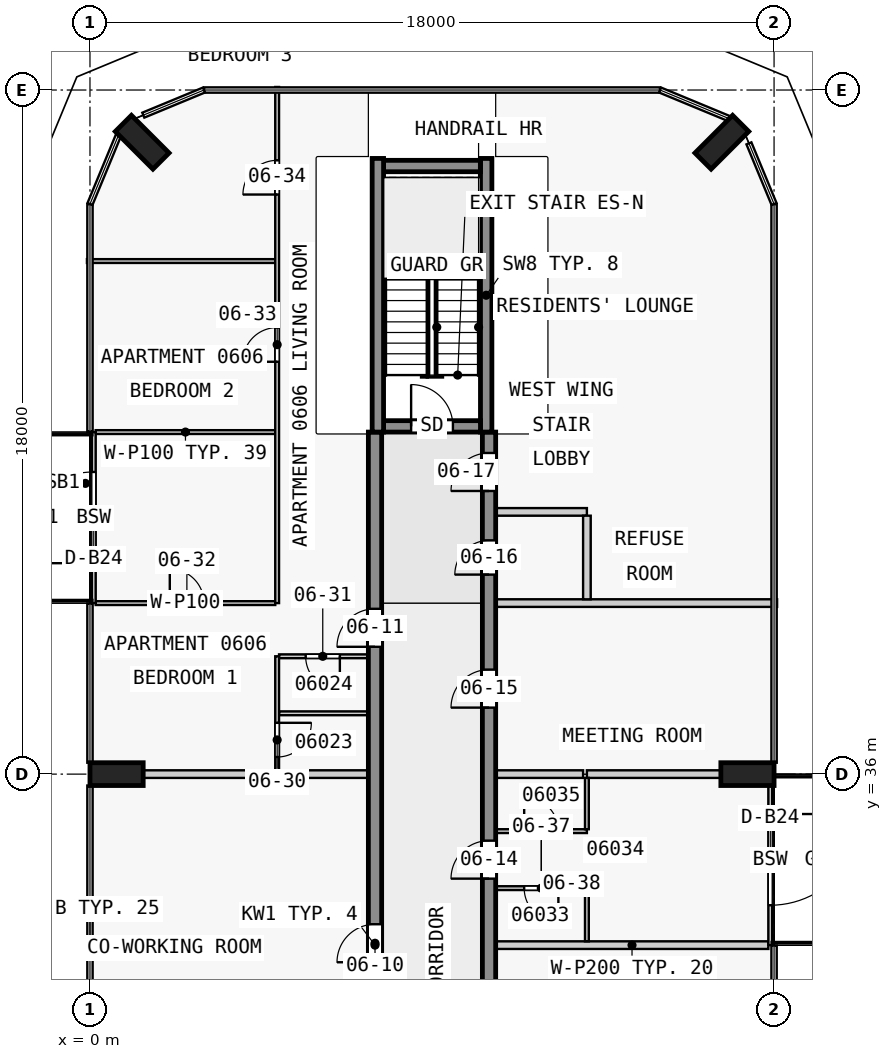
"""IFC4 building model, lengths in metres.
Left out: names, types, materials, properties, quantities, classifications, styles, units other than length and angle.
Written with IfcOpenShell. Run it as: python <this file> out.ifc"""

import sys

from ifc_helpers import new_model, si_unit, direction, frame, frame_2d, origin, origin_2d, place, context, subcontext, project, spatial, rectangle, extrude, element, fill, save


model = new_model("IFC4")
c1 = context("Model", 3, precision=1e-05, world=origin(), true_north=direction((0.0, 1.0)))
c2 = subcontext(c1, "Body", "Model", "MODEL_VIEW")
j1 = project(units=[si_unit("LENGTHUNIT", "METRE"), si_unit("PLANEANGLEUNIT", "RADIAN")], contexts=[c1])
p1 = place(None, origin())
s1 = spatial("IfcSite", under=j1, at=p1, CompositionType="ELEMENT")
p2 = place(p1, origin())
s2 = spatial("IfcBuilding", under=s1, at=p2, CompositionType="ELEMENT")
p3 = place(p2, frame((0.0, 0.0, 30.3)))
s3 = spatial("IfcBuildingStorey", under=s2, at=p3, CompositionType="ELEMENT", Elevation=30.3)
for number, where, z_axis, x_axis in (
    (1, (17.3, 36.0, 0.0), (0.0, 0.0, 1.0), (0.0, 1.0, 0.0)),
    (2, (16.626, 52.626, 0.0), (0.0, 0.0, 1.0), (-0.707, 0.707, 0.0)),
    (3, (1.374, 52.626, 0.0), (0.0, 0.0, 1.0), (0.707, 0.707, 0.0)),
    (4, (0.7, 36.0, 0.0), (0.0, 0.0, 1.0), (0.0, 1.0, 0.0)),
):
    element("IfcColumn", number, at=place(p3, frame(where, z_axis=z_axis, x_axis=x_axis)), inside=s3, PredefinedType="COLUMN", context=c2, shape_type="SweptSolid", body=[
        extrude(rectangle(XDim=0.6, YDim=1.4, at=origin_2d()), origin(), (0.0, 0.0, 1.0), 3.5),
    ])
p4 = place(p3, frame((7.725, 45.15, 0.0), z_axis=(0.0, 0.0, 1.0), x_axis=(1.0, 0.0, 0.0)))
e5 = element("IfcWall", 5, at=p4, inside=s3, PredefinedType="SHEAR", context=c2, shape_type="SweptSolid", body=[
    extrude(rectangle(XDim=2.55, YDim=0.3, at=frame_2d((1.275, 0.0))), origin(), (0.0, 0.0, 1.0), 3.5),
])
p5 = place(p4, frame((0.725, 0.0, 0.0)))
e6 = element("IfcOpeningElement", 6, at=p5, cuts=e5, PredefinedType="OPENING", context=c2, shape_type="SweptSolid", body=[
    extrude(rectangle(XDim=1.1, YDim=2.1, at=frame_2d((0.55, 1.05))), frame((0.0, 0.16, 0.0), z_axis=(0.0, -1.0, 0.0), x_axis=(1.0, 0.0, 0.0)), (0.0, 0.0, 1.0), 0.32),
])
p6 = place(p3, frame((7.725, 52.0, 0.0), z_axis=(0.0, 0.0, 1.0), x_axis=(1.0, 0.0, 0.0)))
e7 = element("IfcWall", 7, at=p6, inside=s3, PredefinedType="SHEAR", context=c2, shape_type="SweptSolid", body=[
    extrude(rectangle(XDim=2.55, YDim=0.3, at=frame_2d((1.275, 0.0))), origin(), (0.0, 0.0, 1.0), 3.5),
])
for number, where, z_axis, x_axis in (
    (8, (7.575, 45.0, 0.0), (0.0, 0.0, 1.0), (0.0, 1.0, 0.0)),
    (9, (10.425, 45.0, 0.0), (0.0, 0.0, 1.0), (0.0, 1.0, 0.0)),
):
    element("IfcWall", number, at=place(p3, frame(where, z_axis=z_axis, x_axis=x_axis)), inside=s3, PredefinedType="SHEAR", context=c2, shape_type="SweptSolid", body=[
        extrude(rectangle(XDim=7.2, YDim=0.3, at=frame_2d((3.6, 0.0))), origin(), (0.0, 0.0, 1.0), 3.5),
    ])
p7 = place(p3, frame((7.5, 18.0, 0.0), z_axis=(0.0, 0.0, 1.0), x_axis=(0.0, 1.0, 0.0)))
e10 = element("IfcWall", 10, at=p7, inside=s3, PredefinedType="SHEAR", context=c2, shape_type="SweptSolid", body=[
    extrude(rectangle(XDim=27.0, YDim=0.35, at=frame_2d((13.5, 0.0))), origin(), (0.0, 0.0, 1.0), 3.25),
])
p8 = place(p7, frame((4.05, 0.0, 0.0)))
e11 = element("IfcOpeningElement", 11, at=p8, cuts=e10, PredefinedType="OPENING", context=c2, shape_type="SweptSolid", body=[
    extrude(rectangle(XDim=1.0, YDim=2.1, at=frame_2d((0.5, 1.05))), frame((0.0, 0.185, 0.0), z_axis=(0.0, -1.0, 0.0), x_axis=(1.0, 0.0, 0.0)), (0.0, 0.0, 1.0), 0.37),
])
p9 = place(p7, frame((13.05, 0.0, 0.0)))
e12 = element("IfcOpeningElement", 12, at=p9, cuts=e10, PredefinedType="OPENING", context=c2, shape_type="SweptSolid", body=[
    extrude(rectangle(XDim=1.0, YDim=2.1, at=frame_2d((0.5, 1.05))), frame((0.0, 0.185, 0.0), z_axis=(0.0, -1.0, 0.0), x_axis=(1.0, 0.0, 0.0)), (0.0, 0.0, 1.0), 0.37),
])
p10 = place(p7, frame((21.35, 0.0, 0.0)))
e13 = element("IfcOpeningElement", 13, at=p10, cuts=e10, PredefinedType="OPENING", context=c2, shape_type="SweptSolid", body=[
    extrude(rectangle(XDim=1.0, YDim=2.1, at=frame_2d((0.5, 1.05))), frame((0.0, 0.185, 0.0), z_axis=(0.0, -1.0, 0.0), x_axis=(1.0, 0.0, 0.0)), (0.0, 0.0, 1.0), 0.37),
])
p11 = place(p3, frame((10.5, 18.0, 0.0), z_axis=(0.0, 0.0, 1.0), x_axis=(0.0, 1.0, 0.0)))
e14 = element("IfcWall", 14, at=p11, inside=s3, PredefinedType="SHEAR", context=c2, shape_type="SweptSolid", body=[
    extrude(rectangle(XDim=27.0, YDim=0.35, at=frame_2d((13.5, 0.0))), origin(), (0.0, 0.0, 1.0), 3.25),
])
p12 = place(p11, frame((1.75, 0.0, 0.0)))
e15 = element("IfcOpeningElement", 15, at=p12, cuts=e14, PredefinedType="OPENING", context=c2, shape_type="SweptSolid", body=[
    extrude(rectangle(XDim=1.0, YDim=2.1, at=frame_2d((0.5, 1.05))), frame((0.0, 0.185, 0.0), z_axis=(0.0, -1.0, 0.0), x_axis=(1.0, 0.0, 0.0)), (0.0, 0.0, 1.0), 0.37),
])
p13 = place(p11, frame((8.55, 0.0, 0.0)))
e16 = element("IfcOpeningElement", 16, at=p13, cuts=e14, PredefinedType="OPENING", context=c2, shape_type="SweptSolid", body=[
    extrude(rectangle(XDim=1.0, YDim=2.1, at=frame_2d((0.5, 1.05))), frame((0.0, 0.185, 0.0), z_axis=(0.0, -1.0, 0.0), x_axis=(1.0, 0.0, 0.0)), (0.0, 0.0, 1.0), 0.37),
])
p14 = place(p11, frame((15.25, 0.0, 0.0)))
e17 = element("IfcOpeningElement", 17, at=p14, cuts=e14, PredefinedType="OPENING", context=c2, shape_type="SweptSolid", body=[
    extrude(rectangle(XDim=1.0, YDim=2.1, at=frame_2d((0.5, 1.05))), frame((0.0, 0.185, 0.0), z_axis=(0.0, -1.0, 0.0), x_axis=(1.0, 0.0, 0.0)), (0.0, 0.0, 1.0), 0.37),
])
p15 = place(p11, frame((19.75, 0.0, 0.0)))
e18 = element("IfcOpeningElement", 18, at=p15, cuts=e14, PredefinedType="OPENING", context=c2, shape_type="SweptSolid", body=[
    extrude(rectangle(XDim=1.0, YDim=2.1, at=frame_2d((0.5, 1.05))), frame((0.0, 0.185, 0.0), z_axis=(0.0, -1.0, 0.0), x_axis=(1.0, 0.0, 0.0)), (0.0, 0.0, 1.0), 0.37),
])
p16 = place(p11, frame((23.25, 0.0, 0.0)))
e19 = element("IfcOpeningElement", 19, at=p16, cuts=e14, PredefinedType="OPENING", context=c2, shape_type="SweptSolid", body=[
    extrude(rectangle(XDim=0.9, YDim=2.1, at=frame_2d((0.45, 1.05))), frame((0.0, 0.185, 0.0), z_axis=(0.0, -1.0, 0.0), x_axis=(1.0, 0.0, 0.0)), (0.0, 0.0, 1.0), 0.37),
])
p17 = place(p11, frame((25.45, 0.0, 0.0)))
e20 = element("IfcOpeningElement", 20, at=p17, cuts=e14, PredefinedType="OPENING", context=c2, shape_type="SweptSolid", body=[
    extrude(rectangle(XDim=1.0, YDim=2.1, at=frame_2d((0.5, 1.05))), frame((0.0, 0.185, 0.0), z_axis=(0.0, -1.0, 0.0), x_axis=(1.0, 0.0, 0.0)), (0.0, 0.0, 1.0), 0.37),
])
p18 = place(p3, frame((0.1, 40.5, 0.0), z_axis=(0.0, 0.0, 1.0), x_axis=(0.0, 1.0, 0.0)))
e21 = element("IfcWall", 21, at=p18, inside=s3, PredefinedType="STANDARD", context=c2, shape_type="SweptSolid", body=[
    extrude(rectangle(XDim=4.5, YDim=0.1, at=frame_2d((2.25, 0.0))), origin(), (0.0, 0.0, 1.0), 3.25),
])
p19 = place(p18, frame((1.05, 0.0, 0.0)))
e22 = element("IfcOpeningElement", 22, at=p19, cuts=e21, PredefinedType="OPENING", context=c2, shape_type="SweptSolid", body=[
    extrude(rectangle(XDim=2.4, YDim=2.4, at=frame_2d((1.2, 1.2))), frame((0.0, 0.06, 0.0), z_axis=(0.0, -1.0, 0.0), x_axis=(1.0, 0.0, 0.0)), (0.0, 0.0, 1.0), 0.12),
])
p20 = place(p3, frame((17.9, 36.0, 0.0), z_axis=(0.0, 0.0, 1.0), x_axis=(0.0, -1.0, 0.0)))
e23 = element("IfcWall", 23, at=p20, inside=s3, PredefinedType="STANDARD", context=c2, shape_type="SweptSolid", body=[
    extrude(rectangle(XDim=4.5, YDim=0.1, at=frame_2d((2.25, 0.0))), origin(), (0.0, 0.0, 1.0), 3.25),
])
p21 = place(p20, frame((1.05, 0.0, 0.0)))
e24 = element("IfcOpeningElement", 24, at=p21, cuts=e23, PredefinedType="OPENING", context=c2, shape_type="SweptSolid", body=[
    extrude(rectangle(XDim=2.4, YDim=2.4, at=frame_2d((1.2, 1.2))), frame((0.0, 0.06, 0.0), z_axis=(0.0, -1.0, 0.0), x_axis=(1.0, 0.0, 0.0)), (0.0, 0.0, 1.0), 0.12),
])
p22 = place(p3, frame((17.85, 31.5, 0.0), z_axis=(0.0, 0.0, 1.0), x_axis=(-1.0, 0.0, 0.0)))
e25 = element("IfcWall", 25, at=p22, inside=s3, PredefinedType="PARTITIONING", context=c2, shape_type="SweptSolid", body=[
    extrude(rectangle(XDim=7.175, YDim=0.2, at=frame_2d((3.587, 0.0))), origin(), (0.0, 0.0, 1.0), 3.25),
])
p23 = place(p3, frame((13.075, 33.0, 0.0), z_axis=(0.0, 0.0, 1.0), x_axis=(-1.0, 0.0, 0.0)))
e26 = element("IfcWall", 26, at=p23, inside=s3, PredefinedType="PARTITIONING", context=c2, shape_type="SweptSolid", body=[
    extrude(rectangle(XDim=2.4, YDim=0.1, at=frame_2d((1.2, 0.0))), origin(), (0.0, 0.0, 1.0), 3.25),
])
p24 = place(p23, frame((0.75, 0.0, 0.0)))
e27 = element("IfcOpeningElement", 27, at=p24, cuts=e26, PredefinedType="OPENING", context=c2, shape_type="SweptSolid", body=[
    extrude(rectangle(XDim=0.9, YDim=2.1, at=frame_2d((0.45, 1.05))), frame((0.0, 0.06, 0.0), z_axis=(0.0, -1.0, 0.0), x_axis=(1.0, 0.0, 0.0)), (0.0, 0.0, 1.0), 0.12),
])
p25 = place(p3, frame((10.675, 34.5, 0.0), z_axis=(0.0, 0.0, 1.0), x_axis=(1.0, 0.0, 0.0)))
e28 = element("IfcWall", 28, at=p25, inside=s3, PredefinedType="PARTITIONING", context=c2, shape_type="SweptSolid", body=[
    extrude(rectangle(XDim=2.4, YDim=0.1, at=frame_2d((1.2, 0.0))), origin(), (0.0, 0.0, 1.0), 3.25),
])
p26 = place(p25, frame((0.75, 0.0, 0.0)))
e29 = element("IfcOpeningElement", 29, at=p26, cuts=e28, PredefinedType="OPENING", context=c2, shape_type="SweptSolid", body=[
    extrude(rectangle(XDim=0.9, YDim=2.1, at=frame_2d((0.45, 1.05))), frame((0.0, 0.06, 0.0), z_axis=(0.0, -1.0, 0.0), x_axis=(1.0, 0.0, 0.0)), (0.0, 0.0, 1.0), 0.12),
])
p27 = place(p3, frame((7.325, 36.0, 0.0), z_axis=(0.0, 0.0, 1.0), x_axis=(-1.0, 0.0, 0.0)))
e30 = element("IfcWall", 30, at=p27, inside=s3, PredefinedType="PARTITIONING", context=c2, shape_type="SweptSolid", body=[
    extrude(rectangle(XDim=5.925, YDim=0.2, at=frame_2d((2.962, 0.0))), origin(), (0.0, 0.0, 1.0), 3.25),
])
p28 = place(p3, frame((12.975, 36.0, 0.0), z_axis=(0.0, 0.0, 1.0), x_axis=(-1.0, 0.0, 0.0)))
e31 = element("IfcWall", 31, at=p28, inside=s3, PredefinedType="PARTITIONING", context=c2, shape_type="SweptSolid", body=[
    extrude(rectangle(XDim=2.3, YDim=0.2, at=frame_2d((1.15, 0.0))), origin(), (0.0, 0.0, 1.0), 3.25),
])
p29 = place(p3, frame((13.075, 36.0, 0.0), z_axis=(0.0, 0.0, 1.0), x_axis=(1.0, 0.0, 0.0)))
e32 = element("IfcWall", 32, at=p29, inside=s3, PredefinedType="PARTITIONING", context=c2, shape_type="SweptSolid", body=[
    extrude(rectangle(XDim=3.525, YDim=0.2, at=frame_2d((1.763, 0.0))), origin(), (0.0, 0.0, 1.0), 3.25),
])
p30 = place(p3, frame((7.325, 37.6, 0.0), z_axis=(0.0, 0.0, 1.0), x_axis=(-1.0, 0.0, 0.0)))
e33 = element("IfcWall", 33, at=p30, inside=s3, PredefinedType="PARTITIONING", context=c2, shape_type="SweptSolid", body=[
    extrude(rectangle(XDim=2.35, YDim=0.1, at=frame_2d((1.175, 0.0))), origin(), (0.0, 0.0, 1.0), 3.25),
])
p31 = place(p3, frame((7.325, 39.1, 0.0), z_axis=(0.0, 0.0, 1.0), x_axis=(-1.0, 0.0, 0.0)))
e34 = element("IfcWall", 34, at=p31, inside=s3, PredefinedType="PARTITIONING", context=c2, shape_type="SweptSolid", body=[
    extrude(rectangle(XDim=2.35, YDim=0.1, at=frame_2d((1.175, 0.0))), origin(), (0.0, 0.0, 1.0), 3.25),
])
p32 = place(p31, frame((0.75, 0.0, 0.0)))
e35 = element("IfcOpeningElement", 35, at=p32, cuts=e34, PredefinedType="OPENING", context=c2, shape_type="SweptSolid", body=[
    extrude(rectangle(XDim=0.9, YDim=2.1, at=frame_2d((0.45, 1.05))), frame((0.0, 0.06, 0.0), z_axis=(0.0, -1.0, 0.0), x_axis=(1.0, 0.0, 0.0)), (0.0, 0.0, 1.0), 0.12),
])
p33 = place(p3, frame((0.15, 40.5, 0.0), z_axis=(0.0, 0.0, 1.0), x_axis=(1.0, 0.0, 0.0)))
e36 = element("IfcWall", 36, at=p33, inside=s3, PredefinedType="PARTITIONING", context=c2, shape_type="SweptSolid", body=[
    extrude(rectangle(XDim=4.725, YDim=0.1, at=frame_2d((2.363, 0.0))), origin(), (0.0, 0.0, 1.0), 3.25),
])
p34 = place(p33, frame((1.95, 0.0, 0.0)))
e37 = element("IfcOpeningElement", 37, at=p34, cuts=e36, PredefinedType="OPENING", context=c2, shape_type="SweptSolid", body=[
    extrude(rectangle(XDim=0.9, YDim=2.1, at=frame_2d((0.45, 1.05))), frame((0.0, 0.06, 0.0), z_axis=(0.0, -1.0, 0.0), x_axis=(1.0, 0.0, 0.0)), (0.0, 0.0, 1.0), 0.12),
])
p35 = place(p3, frame((18.08, 40.5, 0.0), z_axis=(0.0, 0.0, 1.0), x_axis=(-1.0, 0.0, 0.0)))
e38 = element("IfcWall", 38, at=p35, inside=s3, PredefinedType="PARTITIONING", context=c2, shape_type="SweptSolid", body=[
    extrude(rectangle(XDim=7.405, YDim=0.2, at=frame_2d((3.703, 0.0))), origin(), (0.0, 0.0, 1.0), 3.25),
])
p36 = place(p3, frame((13.075, 42.9, 0.0), z_axis=(0.0, 0.0, 1.0), x_axis=(-1.0, 0.0, 0.0)))
e39 = element("IfcWall", 39, at=p36, inside=s3, PredefinedType="PARTITIONING", context=c2, shape_type="SweptSolid", body=[
    extrude(rectangle(XDim=2.4, YDim=0.2, at=frame_2d((1.2, 0.0))), origin(), (0.0, 0.0, 1.0), 3.25),
])
p37 = place(p3, frame((4.875, 45.0, 0.0), z_axis=(0.0, 0.0, 1.0), x_axis=(-1.0, 0.0, 0.0)))
e40 = element("IfcWall", 40, at=p37, inside=s3, PredefinedType="PARTITIONING", context=c2, shape_type="SweptSolid", body=[
    extrude(rectangle(XDim=4.725, YDim=0.1, at=frame_2d((2.363, 0.0))), origin(), (0.0, 0.0, 1.0), 3.25),
])
p38 = place(p3, frame((4.875, 49.5, 0.0), z_axis=(0.0, 0.0, 1.0), x_axis=(-1.0, 0.0, 0.0)))
e41 = element("IfcWall", 41, at=p38, inside=s3, PredefinedType="PARTITIONING", context=c2, shape_type="SweptSolid", body=[
    extrude(rectangle(XDim=4.955, YDim=0.1, at=frame_2d((2.478, 0.0))), origin(), (0.0, 0.0, 1.0), 3.25),
])
p39 = place(p3, frame((4.925, 39.1, 0.0), z_axis=(0.0, 0.0, 1.0), x_axis=(0.0, -1.0, 0.0)))
e42 = element("IfcWall", 42, at=p39, inside=s3, PredefinedType="PARTITIONING", context=c2, shape_type="SweptSolid", body=[
    extrude(rectangle(XDim=3.0, YDim=0.1, at=frame_2d((1.5, 0.0))), origin(), (0.0, 0.0, 1.0), 3.25),
])
p40 = place(p39, frame((1.75, 0.0, 0.0)))
e43 = element("IfcOpeningElement", 43, at=p40, cuts=e42, PredefinedType="OPENING", context=c2, shape_type="SweptSolid", body=[
    extrude(rectangle(XDim=0.9, YDim=2.1, at=frame_2d((0.45, 1.05))), frame((0.0, 0.06, 0.0), z_axis=(0.0, -1.0, 0.0), x_axis=(1.0, 0.0, 0.0)), (0.0, 0.0, 1.0), 0.12),
])
p41 = place(p3, frame((4.925, 40.5, 0.0), z_axis=(0.0, 0.0, 1.0), x_axis=(0.0, 1.0, 0.0)))
e44 = element("IfcWall", 44, at=p41, inside=s3, PredefinedType="PARTITIONING", context=c2, shape_type="SweptSolid", body=[
    extrude(rectangle(XDim=13.58, YDim=0.1, at=frame_2d((6.79, 0.0))), origin(), (0.0, 0.0, 1.0), 3.25),
])
p42 = place(p41, frame((6.35, 0.0, 0.0)))
e45 = element("IfcOpeningElement", 45, at=p42, cuts=e44, PredefinedType="OPENING", context=c2, shape_type="SweptSolid", body=[
    extrude(rectangle(XDim=0.9, YDim=2.1, at=frame_2d((0.45, 1.05))), frame((0.0, 0.06, 0.0), z_axis=(0.0, -1.0, 0.0), x_axis=(1.0, 0.0, 0.0)), (0.0, 0.0, 1.0), 0.12),
])
p43 = place(p41, frame((10.75, 0.0, 0.0)))
e46 = element("IfcOpeningElement", 46, at=p43, cuts=e44, PredefinedType="OPENING", context=c2, shape_type="SweptSolid", body=[
    extrude(rectangle(XDim=0.9, YDim=2.1, at=frame_2d((0.45, 1.05))), frame((0.0, 0.06, 0.0), z_axis=(0.0, -1.0, 0.0), x_axis=(1.0, 0.0, 0.0)), (0.0, 0.0, 1.0), 0.12),
])
for number, where, z_axis, x_axis in (
    (47, (13.075, 31.6, 0.0), (0.0, 0.0, 1.0), (0.0, 1.0, 0.0)),
    (48, (13.075, 34.55, 0.0), (0.0, 0.0, 1.0), (0.0, 1.0, 0.0)),
):
    element("IfcWall", number, at=place(p3, frame(where, z_axis=z_axis, x_axis=x_axis)), inside=s3, PredefinedType="PARTITIONING", context=c2, shape_type="SweptSolid", body=[
        extrude(rectangle(XDim=1.35, YDim=0.1, at=frame_2d((0.675, 0.0))), origin(), (0.0, 0.0, 1.0), 3.25),
    ])
p44 = place(p3, frame((13.075, 40.6, 0.0), z_axis=(0.0, 0.0, 1.0), x_axis=(0.0, 1.0, 0.0)))
e49 = element("IfcWall", 49, at=p44, inside=s3, PredefinedType="PARTITIONING", context=c2, shape_type="SweptSolid", body=[
    extrude(rectangle(XDim=2.2, YDim=0.2, at=frame_2d((1.1, 0.0))), origin(), (0.0, 0.0, 1.0), 3.25),
])
p45 = place(p19, origin())
e50 = element("IfcDoor", 50, at=p45, inside=s3, OperationType="SINGLE_SWING_LEFT", PredefinedType="DOOR", context=c2, shape_type="SweptSolid", body=[
    extrude(rectangle(XDim=2.4, YDim=2.4, at=frame_2d((1.2, 1.2))), frame((0.0, 0.025, 0.0), z_axis=(0.0, -1.0, 0.0), x_axis=(1.0, 0.0, 0.0)), (0.0, 0.0, 1.0), 0.05),
])
fill(e22, e50)
p46 = place(p21, origin())
e51 = element("IfcDoor", 51, at=p46, inside=s3, OperationType="SINGLE_SWING_LEFT", PredefinedType="DOOR", context=c2, shape_type="SweptSolid", body=[
    extrude(rectangle(XDim=2.4, YDim=2.4, at=frame_2d((1.2, 1.2))), frame((0.0, 0.025, 0.0), z_axis=(0.0, -1.0, 0.0), x_axis=(1.0, 0.0, 0.0)), (0.0, 0.0, 1.0), 0.05),
])
fill(e24, e51)
p47 = place(p5, origin())
e52 = element("IfcDoor", 52, at=p47, inside=s3, OperationType="SINGLE_SWING_LEFT", PredefinedType="DOOR", context=c2, shape_type="SweptSolid", body=[
    extrude(rectangle(XDim=1.1, YDim=2.1, at=frame_2d((0.55, 1.05))), frame((0.0, 0.025, 0.0), z_axis=(0.0, -1.0, 0.0), x_axis=(1.0, 0.0, 0.0)), (0.0, 0.0, 1.0), 0.05),
])
fill(e6, e52)
p48 = place(p9, origin())
e53 = element("IfcDoor", 53, at=p48, inside=s3, OperationType="SINGLE_SWING_RIGHT", PredefinedType="DOOR", context=c2, shape_type="SweptSolid", body=[
    extrude(rectangle(XDim=1.0, YDim=2.1, at=frame_2d((0.5, 1.05))), frame((0.0, 0.025, 0.0), z_axis=(0.0, -1.0, 0.0), x_axis=(1.0, 0.0, 0.0)), (0.0, 0.0, 1.0), 0.05),
])
fill(e12, e53)
p49 = place(p10, origin())
e54 = element("IfcDoor", 54, at=p49, inside=s3, OperationType="SINGLE_SWING_RIGHT", PredefinedType="DOOR", context=c2, shape_type="SweptSolid", body=[
    extrude(rectangle(XDim=1.0, YDim=2.1, at=frame_2d((0.5, 1.05))), frame((0.0, 0.025, 0.0), z_axis=(0.0, -1.0, 0.0), x_axis=(1.0, 0.0, 0.0)), (0.0, 0.0, 1.0), 0.05),
])
fill(e13, e54)
p50 = place(p14, origin())
e55 = element("IfcDoor", 55, at=p50, inside=s3, OperationType="SINGLE_SWING_RIGHT", PredefinedType="DOOR", context=c2, shape_type="SweptSolid", body=[
    extrude(rectangle(XDim=1.0, YDim=2.1, at=frame_2d((0.5, 1.05))), frame((0.0, 0.025, 0.0), z_axis=(0.0, -1.0, 0.0), x_axis=(1.0, 0.0, 0.0)), (0.0, 0.0, 1.0), 0.05),
])
fill(e17, e55)
p51 = place(p15, origin())
e56 = element("IfcDoor", 56, at=p51, inside=s3, OperationType="SINGLE_SWING_RIGHT", PredefinedType="DOOR", context=c2, shape_type="SweptSolid", body=[
    extrude(rectangle(XDim=1.0, YDim=2.1, at=frame_2d((0.5, 1.05))), frame((0.0, 0.025, 0.0), z_axis=(0.0, -1.0, 0.0), x_axis=(1.0, 0.0, 0.0)), (0.0, 0.0, 1.0), 0.05),
])
fill(e18, e56)
p52 = place(p16, origin())
e57 = element("IfcDoor", 57, at=p52, inside=s3, OperationType="SINGLE_SWING_RIGHT", PredefinedType="DOOR", context=c2, shape_type="SweptSolid", body=[
    extrude(rectangle(XDim=0.9, YDim=2.1, at=frame_2d((0.45, 1.05))), frame((0.0, 0.025, 0.0), z_axis=(0.0, -1.0, 0.0), x_axis=(1.0, 0.0, 0.0)), (0.0, 0.0, 1.0), 0.05),
])
fill(e19, e57)
p53 = place(p17, origin())
e58 = element("IfcDoor", 58, at=p53, inside=s3, OperationType="SINGLE_SWING_RIGHT", PredefinedType="DOOR", context=c2, shape_type="SweptSolid", body=[
    extrude(rectangle(XDim=1.0, YDim=2.1, at=frame_2d((0.5, 1.05))), frame((0.0, 0.025, 0.0), z_axis=(0.0, -1.0, 0.0), x_axis=(1.0, 0.0, 0.0)), (0.0, 0.0, 1.0), 0.05),
])
fill(e20, e58)
p54 = place(p40, origin())
e59 = element("IfcDoor", 59, at=p54, inside=s3, OperationType="SINGLE_SWING_RIGHT", PredefinedType="DOOR", context=c2, shape_type="SweptSolid", body=[
    extrude(rectangle(XDim=0.9, YDim=2.1, at=frame_2d((0.45, 1.05))), frame((0.0, 0.025, 0.0), z_axis=(0.0, -1.0, 0.0), x_axis=(1.0, 0.0, 0.0)), (0.0, 0.0, 1.0), 0.05),
])
fill(e43, e59)
p55 = place(p32, origin())
e60 = element("IfcDoor", 60, at=p55, inside=s3, OperationType="SINGLE_SWING_RIGHT", PredefinedType="DOOR", context=c2, shape_type="SweptSolid", body=[
    extrude(rectangle(XDim=0.9, YDim=2.1, at=frame_2d((0.45, 1.05))), frame((0.0, 0.025, 0.0), z_axis=(0.0, -1.0, 0.0), x_axis=(1.0, 0.0, 0.0)), (0.0, 0.0, 1.0), 0.05),
])
fill(e35, e60)
p56 = place(p34, origin())
e61 = element("IfcDoor", 61, at=p56, inside=s3, OperationType="SINGLE_SWING_RIGHT", PredefinedType="DOOR", context=c2, shape_type="SweptSolid", body=[
    extrude(rectangle(XDim=0.9, YDim=2.1, at=frame_2d((0.45, 1.05))), frame((0.0, 0.025, 0.0), z_axis=(0.0, -1.0, 0.0), x_axis=(1.0, 0.0, 0.0)), (0.0, 0.0, 1.0), 0.05),
])
fill(e37, e61)
p57 = place(p42, origin())
e62 = element("IfcDoor", 62, at=p57, inside=s3, OperationType="SINGLE_SWING_RIGHT", PredefinedType="DOOR", context=c2, shape_type="SweptSolid", body=[
    extrude(rectangle(XDim=0.9, YDim=2.1, at=frame_2d((0.45, 1.05))), frame((0.0, 0.025, 0.0), z_axis=(0.0, -1.0, 0.0), x_axis=(1.0, 0.0, 0.0)), (0.0, 0.0, 1.0), 0.05),
])
fill(e45, e62)
p58 = place(p43, origin())
e63 = element("IfcDoor", 63, at=p58, inside=s3, OperationType="SINGLE_SWING_RIGHT", PredefinedType="DOOR", context=c2, shape_type="SweptSolid", body=[
    extrude(rectangle(XDim=0.9, YDim=2.1, at=frame_2d((0.45, 1.05))), frame((0.0, 0.025, 0.0), z_axis=(0.0, -1.0, 0.0), x_axis=(1.0, 0.0, 0.0)), (0.0, 0.0, 1.0), 0.05),
])
fill(e46, e63)
p59 = place(p24, origin())
e64 = element("IfcDoor", 64, at=p59, inside=s3, OperationType="SINGLE_SWING_RIGHT", PredefinedType="DOOR", context=c2, shape_type="SweptSolid", body=[
    extrude(rectangle(XDim=0.9, YDim=2.1, at=frame_2d((0.45, 1.05))), frame((0.0, 0.025, 0.0), z_axis=(0.0, -1.0, 0.0), x_axis=(1.0, 0.0, 0.0)), (0.0, 0.0, 1.0), 0.05),
])
fill(e27, e64)
p60 = place(p26, origin())
e65 = element("IfcDoor", 65, at=p60, inside=s3, OperationType="SINGLE_SWING_RIGHT", PredefinedType="DOOR", context=c2, shape_type="SweptSolid", body=[
    extrude(rectangle(XDim=0.9, YDim=2.1, at=frame_2d((0.45, 1.05))), frame((0.0, 0.025, 0.0), z_axis=(0.0, -1.0, 0.0), x_axis=(1.0, 0.0, 0.0)), (0.0, 0.0, 1.0), 0.05),
])
fill(e29, e65)
save(model, sys.argv[1])
